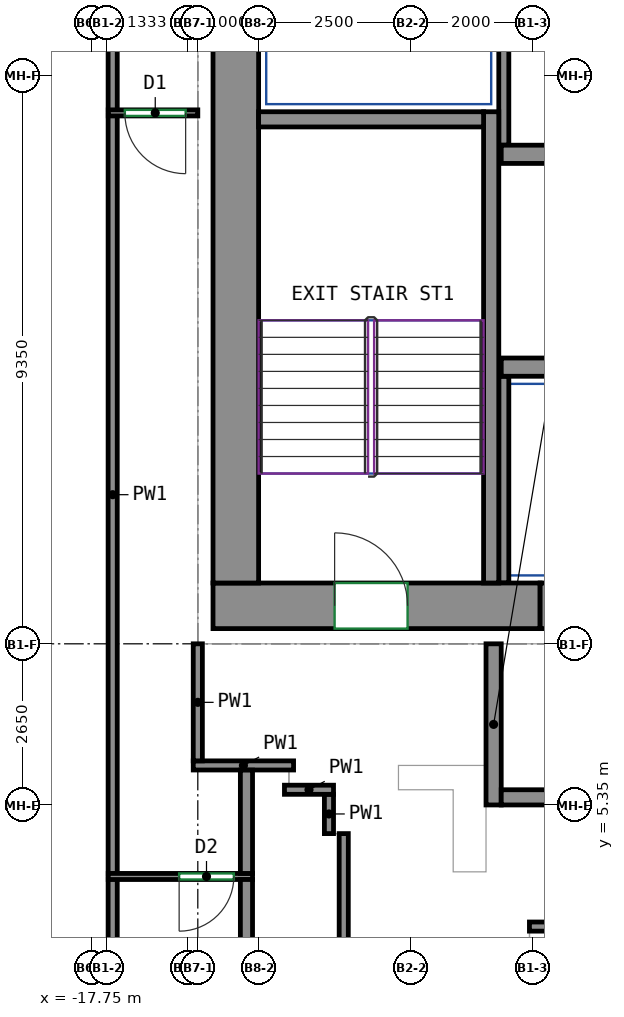
"""IFC4 building model, lengths in metres.
Left out: names, types, materials, properties, quantities, classifications, styles, units other than length and angle.
Written with IfcOpenShell. Run it as: python <this file> out.ifc"""

import sys

from ifc_helpers import new_model, si_unit, direction, frame, frame_2d, origin, place, context, subcontext, project, spatial, rectangle, extrude, source, transform, mapped, element, fill, save


model = new_model("IFC4")
c1 = context("Model", 3, precision=1e-05, world=origin(), true_north=direction((0.0, 1.0)))
c2 = subcontext(c1, "Body", "Model", "MODEL_VIEW")
j1 = project(units=[si_unit("LENGTHUNIT", "METRE"), si_unit("PLANEANGLEUNIT", "RADIAN")], contexts=[c1])
p1 = place(None, origin())
s1 = spatial("IfcSite", under=j1, at=p1, CompositionType="ELEMENT")
p2 = place(p1, origin())
s2 = spatial("IfcBuilding", under=s1, at=p2, CompositionType="ELEMENT")
p3 = place(p2, frame((0.0, 0.0, 252.6)))
s3 = spatial("IfcBuildingStorey", under=s2, at=p3, CompositionType="ELEMENT", Elevation=252.6)
m1 = source(origin(), c2, "Body", "SweptSolid", [
    extrude(rectangle(XDim=5.38, YDim=0.75, at=frame_2d((2.69, 0.0))), origin(), (0.0, 0.0, 1.0), 3.12),
])
p4 = place(p3, frame((-15.75, 8.625, 0.0), z_axis=(0.0, 0.0, 1.0), x_axis=(1.0, 0.0, 0.0)))
e1 = element("IfcWall", 1, at=p4, inside=s3, PredefinedType="SHEAR", context=c2, shape_type="MappedRepresentation", body=[
    mapped(m1, transform((0.0, 0.0, 0.0))),
])
p5 = place(p4, frame((2.0, 0.0, 0.0)))
e2 = element("IfcOpeningElement", 2, at=p5, cuts=e1, PredefinedType="OPENING", context=c2, shape_type="SweptSolid", body=[
    extrude(rectangle(XDim=1.2, YDim=2.1, at=frame_2d((0.6, 1.05))), frame((0.0, 0.385, 0.0), z_axis=(0.0, -1.0, 0.0), x_axis=(1.0, 0.0, 0.0)), (0.0, 0.0, 1.0), 0.77),
])
m2 = source(origin(), c2, "Body", "SweptSolid", [
    extrude(rectangle(XDim=12.0, YDim=0.75, at=frame_2d((6.0, 0.0))), origin(), (0.0, 0.0, 1.0), 3.12),
])
p6 = place(p3, frame((-15.375, 9.0, 0.0), z_axis=(0.0, 0.0, 1.0), x_axis=(0.0, 1.0, 0.0)))
e3 = element("IfcWall", 3, at=p6, inside=s3, PredefinedType="SHEAR", context=c2, shape_type="MappedRepresentation", body=[
    mapped(m2, transform((0.0, 0.0, 0.0))),
])
m3 = source(origin(), c2, "Body", "SweptSolid", [
    extrude(rectangle(XDim=7.75, YDim=0.25, at=frame_2d((3.875, 0.0))), origin(), (0.0, 0.0, 1.0), 3.12),
])
p7 = place(p3, frame((-11.175, 9.0, 0.0), z_axis=(0.0, 0.0, 1.0), x_axis=(0.0, 1.0, 0.0)))
e4 = element("IfcWall", 4, at=p7, inside=s3, PredefinedType="SHEAR", context=c2, shape_type="MappedRepresentation", body=[
    mapped(m3, transform((0.0, 0.0, 0.0))),
])
m4 = source(origin(), c2, "Body", "SweptSolid", [
    extrude(rectangle(XDim=3.7, YDim=0.25, at=frame_2d((1.85, 0.0))), origin(), (0.0, 0.0, 1.0), 3.12),
])
p8 = place(p3, frame((-15.0, 16.625, 0.0), z_axis=(0.0, 0.0, 1.0), x_axis=(1.0, 0.0, 0.0)))
e5 = element("IfcWall", 5, at=p8, inside=s3, PredefinedType="SHEAR", context=c2, shape_type="MappedRepresentation", body=[
    mapped(m4, transform((0.0, 0.0, 0.0))),
])
m5 = source(origin(), c2, "Body", "SweptSolid", [
    extrude(rectangle(XDim=6.0, YDim=0.3, at=frame_2d((3.0, 0.0))), origin(), (0.0, 0.0, 1.0), 3.12),
])
p9 = place(p3, frame((-11.01, 12.55, 0.0), z_axis=(0.0, 0.0, 1.0), x_axis=(1.0, 0.0, 0.0)))
e6 = element("IfcWall", 6, at=p9, inside=s3, PredefinedType="SHEAR", context=c2, shape_type="MappedRepresentation", body=[
    mapped(m5, transform((0.0, 0.0, 0.0))),
])
m6 = source(origin(), c2, "Body", "SweptSolid", [
    extrude(rectangle(XDim=22.08, YDim=0.3, at=frame_2d((11.04, 0.0))), origin(), (0.0, 0.0, 1.0), 3.12),
])
p10 = place(p3, frame((-11.01, 16.05, 0.0), z_axis=(0.0, 0.0, 1.0), x_axis=(1.0, 0.0, 0.0)))
e7 = element("IfcWall", 7, at=p10, inside=s3, PredefinedType="SHEAR", context=c2, shape_type="MappedRepresentation", body=[
    mapped(m6, transform((0.0, 0.0, 0.0))),
])
m7 = source(origin(), c2, "Body", "SweptSolid", [
    extrude(rectangle(XDim=2.65, YDim=0.25, at=frame_2d((1.325, 0.0))), origin(), (0.0, 0.0, 1.0), 2.57),
])
p11 = place(p3, frame((-11.135, 5.35, 0.0), z_axis=(0.0, 0.0, 1.0), x_axis=(0.0, 1.0, 0.0)))
e8 = element("IfcWall", 8, at=p11, inside=s3, PredefinedType="PARTITIONING", context=c2, shape_type="MappedRepresentation", body=[
    mapped(m7, transform((0.0, 0.0, 0.0))),
])
m8 = source(origin(), c2, "Body", "SweptSolid", [
    extrude(rectangle(XDim=5.36, YDim=0.25, at=frame_2d((2.68, 0.0))), origin(), (0.0, 0.0, 1.0), 3.12),
])
p12 = place(p3, frame((-11.01, 5.475, 0.0), z_axis=(0.0, 0.0, 1.0), x_axis=(1.0, 0.0, 0.0)))
e9 = element("IfcWall", 9, at=p12, inside=s3, PredefinedType="PARTITIONING", context=c2, shape_type="MappedRepresentation", body=[
    mapped(m8, transform((0.0, 0.0, 0.0))),
])
p13 = place(p12, frame((2.28, 0.0, 0.0)))
e10 = element("IfcOpeningElement", 10, at=p13, cuts=e9, PredefinedType="OPENING", context=c2, shape_type="SweptSolid", body=[
    extrude(rectangle(XDim=0.8, YDim=2.0, at=frame_2d((0.4, 1.0))), frame((0.0, 0.135, 0.0), z_axis=(0.0, -1.0, 0.0), x_axis=(1.0, 0.0, 0.0)), (0.0, 0.0, 1.0), 0.27),
])
m9 = source(origin(), c2, "Body", "SweptSolid", [
    extrude(rectangle(XDim=4.8, YDim=0.165, at=frame_2d((2.4, 0.0))), origin(), (0.0, 0.0, 1.0), 3.12),
])
p14 = place(p3, frame((-10.968, 16.2, 0.0), z_axis=(0.0, 0.0, 1.0), x_axis=(0.0, 1.0, 0.0)))
e11 = element("IfcWall", 11, at=p14, inside=s3, PredefinedType="PARTITIONING", context=c2, shape_type="MappedRepresentation", body=[
    mapped(m9, transform((0.0, 0.0, 0.0))),
])
m10 = source(origin(), c2, "Body", "SweptSolid", [
    extrude(rectangle(XDim=3.4, YDim=0.165, at=frame_2d((1.7, 0.0))), origin(), (0.0, 0.0, 1.0), 3.12),
])
p15 = place(p3, frame((-10.968, 9.0, 0.0), z_axis=(0.0, 0.0, 1.0), x_axis=(0.0, 1.0, 0.0)))
e12 = element("IfcWall", 12, at=p15, inside=s3, PredefinedType="PARTITIONING", context=c2, shape_type="MappedRepresentation", body=[
    mapped(m10, transform((0.0, 0.0, 0.0))),
])
m11 = source(origin(), c2, "Body", "SweptSolid", [
    extrude(rectangle(XDim=1.4, YDim=0.75, at=frame_2d((0.7, 0.0))), origin(), (0.0, 0.0, 1.0), 2.7),
])
p16 = place(p3, frame((-10.37, 8.625, 0.0), z_axis=(0.0, 0.0, 1.0), x_axis=(1.0, 0.0, 0.0)))
e13 = element("IfcWall", 13, at=p16, inside=s3, PredefinedType="PARTITIONING", context=c2, shape_type="MappedRepresentation", body=[
    mapped(m11, transform((0.0, 0.0, 0.0))),
])
p17 = place(p16, frame((0.25, 0.0, 0.0)))
e14 = element("IfcOpeningElement", 14, at=p17, cuts=e13, PredefinedType="OPENING", context=c2, shape_type="SweptSolid", body=[
    extrude(rectangle(XDim=0.9, YDim=2.1, at=frame_2d((0.45, 1.05))), frame((0.0, 0.385, 0.0), z_axis=(0.0, -1.0, 0.0), x_axis=(1.0, 0.0, 0.0)), (0.0, 0.0, 1.0), 0.77),
])
p18 = place(p3, frame((-17.4, -1.791, 0.0), z_axis=(0.0, 0.0, 1.0), x_axis=(0.0, 1.0, 0.0)))
e15 = element("IfcWall", 15, at=p18, inside=s3, PredefinedType="PARTITIONING", context=c2, shape_type="SweptSolid", body=[
    extrude(rectangle(XDim=5.925, YDim=0.15, at=frame_2d((2.962, 0.0))), origin(), (0.0, 0.0, 1.0), 3.12),
])
p19 = place(p3, frame((-17.4, 4.214, 0.0), z_axis=(0.0, 0.0, 1.0), x_axis=(0.0, 1.0, 0.0)))
e16 = element("IfcWall", 16, at=p19, inside=s3, PredefinedType="PARTITIONING", context=c2, shape_type="SweptSolid", body=[
    extrude(rectangle(XDim=12.477, YDim=0.15, at=frame_2d((6.238, 0.0))), origin(), (0.0, 0.0, 1.0), 3.12),
])
p20 = place(p3, frame((-16.075, 6.0, 0.0), z_axis=(0.0, 0.0, 1.0), x_axis=(1.0, 0.0, 0.0)))
e17 = element("IfcWall", 17, at=p20, inside=s3, PredefinedType="PARTITIONING", context=c2, shape_type="SweptSolid", body=[
    extrude(rectangle(XDim=1.65, YDim=0.15, at=frame_2d((0.825, 0.0))), origin(), (0.0, 0.0, 1.0), 3.12),
])
p21 = place(p3, frame((-16.0, 6.075, 0.0), z_axis=(0.0, 0.0, 1.0), x_axis=(0.0, 1.0, 0.0)))
e18 = element("IfcWall", 18, at=p21, inside=s3, PredefinedType="PARTITIONING", context=c2, shape_type="SweptSolid", body=[
    extrude(rectangle(XDim=1.925, YDim=0.15, at=frame_2d((0.962, 0.0))), origin(), (0.0, 0.0, 1.0), 3.12),
])
p22 = place(p3, frame((-17.4, 16.771, 0.0), z_axis=(0.0, 0.0, 1.0), x_axis=(0.0, 1.0, 0.0)))
e19 = element("IfcWall", 19, at=p22, inside=s3, PredefinedType="PARTITIONING", context=c2, shape_type="SweptSolid", body=[
    extrude(rectangle(XDim=4.254, YDim=0.15, at=frame_2d((2.127, 0.0))), origin(), (0.0, 0.0, 1.0), 3.12),
])
p23 = place(p3, frame((-13.6, 4.879, 0.0), z_axis=(0.0, 0.0, 1.0), x_axis=(0.0, -1.0, 0.0)))
e20 = element("IfcWall", 20, at=p23, inside=s3, PredefinedType="PARTITIONING", context=c2, shape_type="SweptSolid", body=[
    extrude(rectangle(XDim=11.004, YDim=0.15, at=frame_2d((5.502, 0.0))), origin(), (0.0, 0.0, 1.0), 3.12),
])
p24 = place(p23, frame((8.904, 0.0, 0.0)))
e21 = element("IfcOpeningElement", 21, at=p24, cuts=e20, PredefinedType="OPENING", context=c2, shape_type="SweptSolid", body=[
    extrude(rectangle(XDim=0.9, YDim=2.1, at=frame_2d((0.45, 1.05))), frame((0.0, 0.085, 0.0), z_axis=(0.0, -1.0, 0.0), x_axis=(1.0, 0.0, 0.0)), (0.0, 0.0, 1.0), 0.17),
])
p25 = place(p3, frame((-13.843, 5.525, 0.0), z_axis=(0.0, 0.0, 1.0), x_axis=(0.0, -1.0, 0.0)))
e22 = element("IfcWall", 22, at=p25, inside=s3, PredefinedType="PARTITIONING", context=c2, shape_type="SweptSolid", body=[
    extrude(rectangle(XDim=0.646, YDim=0.15, at=frame_2d((0.323, 0.0))), origin(), (0.0, 0.0, 1.0), 3.12),
])
p26 = place(p3, frame((-14.575, 5.6, 0.0), z_axis=(0.0, 0.0, 1.0), x_axis=(1.0, 0.0, 0.0)))
e23 = element("IfcWall", 23, at=p26, inside=s3, PredefinedType="PARTITIONING", context=c2, shape_type="SweptSolid", body=[
    extrude(rectangle(XDim=0.807, YDim=0.15, at=frame_2d((0.403, 0.0))), origin(), (0.0, 0.0, 1.0), 3.12),
])
p27 = place(p3, frame((-10.546, 3.35, 0.0), z_axis=(0.0, 0.0, 1.0), x_axis=(1.0, 0.0, 0.0)))
e24 = element("IfcWall", 24, at=p27, inside=s3, PredefinedType="PARTITIONING", context=c2, shape_type="SweptSolid", body=[
    extrude(rectangle(XDim=3.896, YDim=0.15, at=frame_2d((1.948, 0.0))), origin(), (0.0, 0.0, 1.0), 3.12),
])
p28 = place(p3, frame((-15.1, 4.174, 0.0), z_axis=(0.0, 0.0, 1.0), x_axis=(-1.0, 0.0, 0.0)))
e25 = element("IfcWall", 25, at=p28, inside=s3, PredefinedType="PARTITIONING", context=c2, shape_type="SweptSolid", body=[
    extrude(rectangle(XDim=2.373, YDim=0.1, at=frame_2d((1.187, 0.0))), origin(), (0.0, 0.0, 1.0), 3.12),
])
p29 = place(p28, frame((0.307, 0.0, 0.0)))
e26 = element("IfcOpeningElement", 26, at=p29, cuts=e25, PredefinedType="OPENING", context=c2, shape_type="SweptSolid", body=[
    extrude(rectangle(XDim=0.9, YDim=2.1, at=frame_2d((0.45, 1.05))), frame((0.0, 0.06, 0.0), z_axis=(0.0, -1.0, 0.0), x_axis=(1.0, 0.0, 0.0)), (0.0, 0.0, 1.0), 0.12),
])
p30 = place(p3, frame((-15.2, -1.781, 0.0), z_axis=(0.0, 0.0, 1.0), x_axis=(0.0, 1.0, 0.0)))
e27 = element("IfcWall", 27, at=p30, inside=s3, PredefinedType="PARTITIONING", context=c2, shape_type="SweptSolid", body=[
    extrude(rectangle(XDim=5.905, YDim=0.2, at=frame_2d((2.953, 0.0))), origin(), (0.0, 0.0, 1.0), 3.12),
])
p31 = place(p3, frame((-16.0, 16.731, 0.0), z_axis=(0.0, 0.0, 1.0), x_axis=(-1.0, 0.0, 0.0)))
e28 = element("IfcWall", 28, at=p31, inside=s3, PredefinedType="PARTITIONING", context=c2, shape_type="SweptSolid", body=[
    extrude(rectangle(XDim=1.473, YDim=0.1, at=frame_2d((0.736, 0.0))), origin(), (0.0, 0.0, 1.0), 3.12),
])
p32 = place(p31, frame((0.2, 0.0, 0.0)))
e29 = element("IfcOpeningElement", 29, at=p32, cuts=e28, PredefinedType="OPENING", context=c2, shape_type="SweptSolid", body=[
    extrude(rectangle(XDim=1.0, YDim=2.1, at=frame_2d((0.5, 1.05))), frame((0.0, 0.06, 0.0), z_axis=(0.0, -1.0, 0.0), x_axis=(1.0, 0.0, 0.0)), (0.0, 0.0, 1.0), 0.12),
])
p33 = place(p3, frame((-15.2, 4.224, 0.0), z_axis=(0.0, 0.0, 1.0), x_axis=(0.0, 1.0, 0.0)))
e30 = element("IfcWall", 30, at=p33, inside=s3, PredefinedType="PARTITIONING", context=c2, shape_type="SweptSolid", body=[
    extrude(rectangle(XDim=1.699, YDim=0.2, at=frame_2d((0.85, 0.0))), origin(), (0.0, 0.0, 1.0), 3.12),
])
p34 = place(p5, origin())
e31 = element("IfcDoor", 31, at=p34, inside=s3, OperationType="DOUBLE_DOOR_SINGLE_SWING", PredefinedType="DOOR", context=c2, shape_type="SweptSolid", body=[
    extrude(rectangle(XDim=1.2, YDim=2.1, at=frame_2d((0.6, 1.05))), frame((0.0, 0.28, 0.0), z_axis=(0.0, -1.0, 0.0), x_axis=(1.0, 0.0, 0.0)), (0.0, 0.0, 1.0), 0.05),
])
fill(e2, e31)
p35 = place(p29, origin())
e32 = element("IfcDoor", 32, at=p35, inside=s3, OperationType="SINGLE_SWING_RIGHT", PredefinedType="DOOR", context=c2, shape_type="SweptSolid", body=[
    extrude(rectangle(XDim=0.9, YDim=2.1, at=frame_2d((0.45, 1.05))), frame((0.0, 0.025, 0.0), z_axis=(0.0, -1.0, 0.0), x_axis=(1.0, 0.0, 0.0)), (0.0, 0.0, 1.0), 0.05),
])
fill(e26, e32)
p36 = place(p32, origin())
e33 = element("IfcDoor", 33, at=p36, inside=s3, OperationType="SINGLE_SWING_LEFT", PredefinedType="DOOR", context=c2, shape_type="SweptSolid", body=[
    extrude(rectangle(XDim=1.0, YDim=2.1, at=frame_2d((0.5, 1.05))), frame((0.0, 0.025, 0.0), z_axis=(0.0, -1.0, 0.0), x_axis=(1.0, 0.0, 0.0)), (0.0, 0.0, 1.0), 0.05),
])
fill(e29, e33)
save(model, sys.argv[1])
